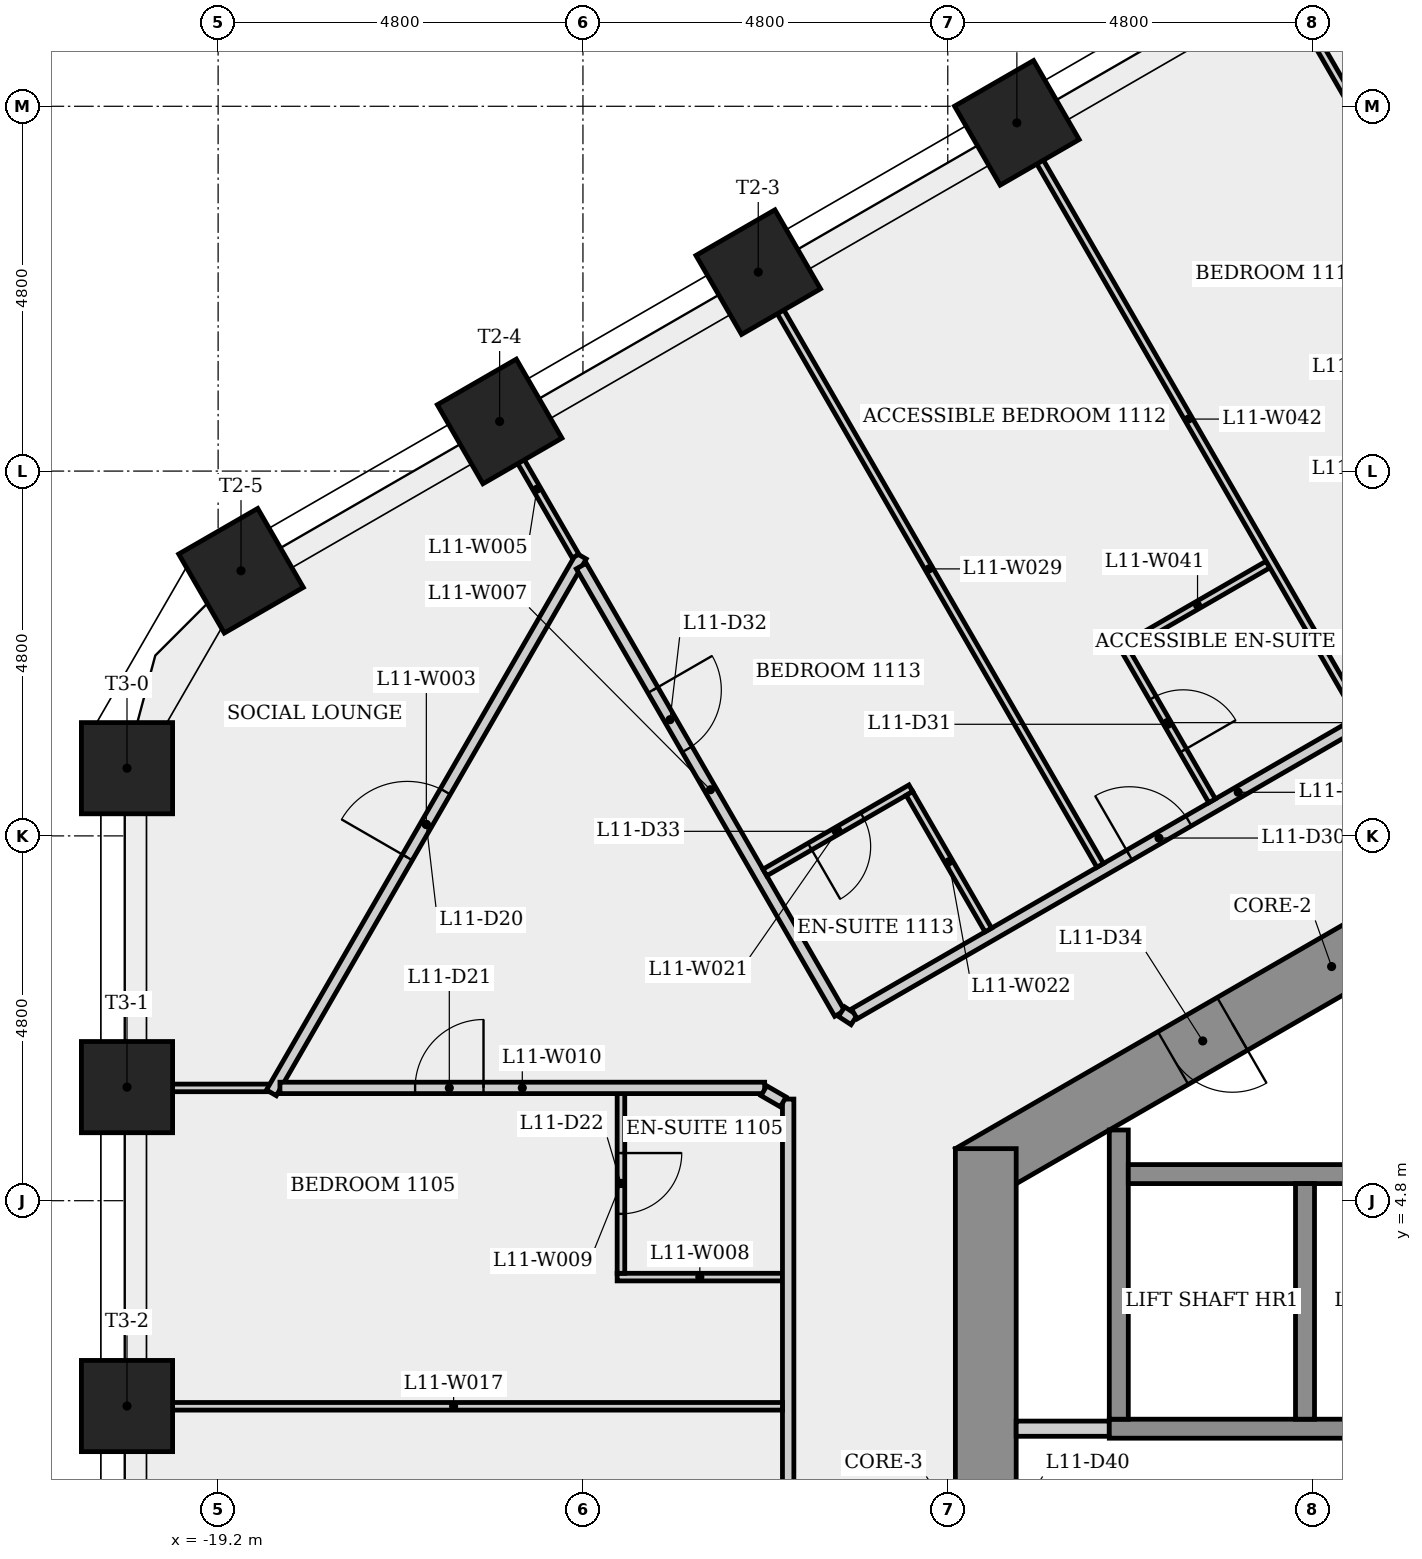
"""IFC4 building model, lengths in metres.
Left out: names, types, materials, properties, quantities, classifications, styles, units other than length and angle.
Written with IfcOpenShell. Run it as: python <this file> out.ifc"""

import sys

from ifc_helpers import new_model, si_unit, direction, frame, frame_2d, origin, origin_2d, place, context, subcontext, project, spatial, rectangle, extrude, element, fill, save


model = new_model("IFC4")
c1 = context("Model", 3, precision=1e-05, world=origin(), true_north=direction((0.0, 1.0)))
c2 = subcontext(c1, "Body", "Model", "MODEL_VIEW")
j1 = project(units=[si_unit("LENGTHUNIT", "METRE"), si_unit("PLANEANGLEUNIT", "RADIAN")], contexts=[c1])
p1 = place(None, origin())
s1 = spatial("IfcSite", under=j1, at=p1, CompositionType="ELEMENT")
p2 = place(p1, origin())
s2 = spatial("IfcBuilding", under=s1, at=p2, CompositionType="ELEMENT")
p3 = place(p2, frame((0.0, 0.0, 45.9)))
s3 = spatial("IfcBuildingStorey", under=s2, at=p3, CompositionType="ELEMENT", Elevation=45.9)
p4 = place(p3, frame((0.2, 10.623, 0.0), z_axis=(0.0, 0.0, 1.0), x_axis=(-0.866023993627, -0.500002442456, 0.0)))
e1 = element("IfcWall", 1, at=p4, inside=s3, PredefinedType="SHEAR", context=c2, shape_type="SweptSolid", body=[
    extrude(rectangle(XDim=10.97, YDim=0.8, at=frame_2d((5.485, 0.0))), origin(), (0.0, 0.0, 1.0), 3.4),
])
p5 = place(p4, frame((6.993, 0.0, 0.0)))
e2 = element("IfcOpeningElement", 2, at=p5, cuts=e1, PredefinedType="OPENING", context=c2, shape_type="SweptSolid", body=[
    extrude(rectangle(XDim=0.9, YDim=2.1, at=frame_2d((0.45, 1.05))), frame((0.0, 0.41, 0.0), z_axis=(0.0, -1.0, 0.0), x_axis=(1.0, 0.0, 0.0)), (0.0, 0.0, 1.0), 0.82),
])
p6 = place(p3, frame((-9.1, 5.485, 0.0), z_axis=(0.0, 0.0, 1.0), x_axis=(0.0, -1.0, 0.0)))
e3 = element("IfcWall", 3, at=p6, inside=s3, PredefinedType="SHEAR", context=c2, shape_type="SweptSolid", body=[
    extrude(rectangle(XDim=10.97, YDim=0.8, at=frame_2d((5.485, 0.0))), origin(), (0.0, 0.0, 1.0), 3.4),
])
p7 = place(p6, frame((4.685, 0.0, 0.0)))
e4 = element("IfcOpeningElement", 4, at=p7, cuts=e3, PredefinedType="OPENING", context=c2, shape_type="SweptSolid", body=[
    extrude(rectangle(XDim=1.6, YDim=2.1, at=frame_2d((0.8, 1.05))), frame((0.0, 0.41, 0.0), z_axis=(0.0, -1.0, 0.0), x_axis=(1.0, 0.0, 0.0)), (0.0, 0.0, 1.0), 0.82),
])
for number, where, z_axis, x_axis in (
    (5, (-8.691, 18.982, 0.0), (0.0, 0.0, 1.0), (-0.5, 0.866, 0.0)),
    (6, (-12.094, 17.018, 0.0), (0.0, 0.0, 1.0), (-0.5, 0.866, 0.0)),
    (7, (-15.496, 15.053, 0.0), (0.0, 0.0, 1.0), (-0.5, 0.866, 0.0)),
    (8, (-18.899, 13.089, 0.0), (0.0, 0.0, 1.0), (-0.5, 0.866, 0.0)),
    (9, (-20.399, 10.491, 0.0), (0.0, 0.0, 1.0), (-1.0, 0.0, 0.0)),
    (10, (-20.399, 6.294, 0.0), (0.0, 0.0, 1.0), (-1.0, 0.0, 0.0)),
    (11, (-20.399, 2.098, 0.0), (0.0, 0.0, 1.0), (-1.0, 0.0, 0.0)),
):
    element("IfcColumn", number, at=place(p3, frame(where, z_axis=z_axis, x_axis=x_axis)), inside=s3, PredefinedType="COLUMN", context=c2, shape_type="SweptSolid", body=[
        extrude(rectangle(XDim=1.2, YDim=1.2, at=origin_2d()), origin(), (0.0, 0.0, 1.0), 3.4),
    ])
p8 = place(p3, frame((-18.537, 6.284, 0.0), z_axis=(0.0, 0.0, 1.0), x_axis=(-1.0, 0.0, 0.0)))
e12 = element("IfcWall", 12, at=p8, inside=s3, PredefinedType="PARTITIONING", context=c2, shape_type="SweptSolid", body=[
    extrude(rectangle(XDim=1.892, YDim=0.1, at=frame_2d((0.946, 0.0))), origin(), (0.0, 0.0, 1.0), 3.05),
])
p9 = place(p3, frame((-18.499, 6.219, 0.0), z_axis=(0.0, 0.0, 1.0), x_axis=(0.499990257196, 0.866031028722, 0.0)))
e13 = element("IfcWall", 13, at=p9, inside=s3, PredefinedType="PARTITIONING", context=c2, shape_type="SweptSolid", body=[
    extrude(rectangle(XDim=8.155, YDim=0.15, at=frame_2d((4.077, 0.0))), origin(), (0.0, 0.0, 1.0), 3.05),
])
p10 = place(p9, frame((3.577, 0.0, 0.0)))
e14 = element("IfcOpeningElement", 14, at=p10, cuts=e13, PredefinedType="OPENING", context=c2, shape_type="SweptSolid", body=[
    extrude(rectangle(XDim=1.0, YDim=2.1, at=frame_2d((0.5, 1.05))), frame((0.0, 0.085, 0.0), z_axis=(0.0, -1.0, 0.0), x_axis=(1.0, 0.0, 0.0)), (0.0, 0.0, 1.0), 0.17),
])
p11 = place(p3, frame((-15.514, 15.043, 0.0), z_axis=(0.0, 0.0, 1.0), x_axis=(0.499985639223, -0.866033694824, 0.0)))
e15 = element("IfcWall", 15, at=p11, inside=s3, PredefinedType="PARTITIONING", context=c2, shape_type="SweptSolid", body=[
    extrude(rectangle(XDim=2.034, YDim=0.1, at=frame_2d((1.017, 0.0))), origin(), (0.0, 0.0, 1.0), 3.05),
])
p12 = place(p3, frame((-14.422, 13.151, 0.0), z_axis=(0.0, 0.0, 1.0), x_axis=(0.499974240439, -0.866040275563, 0.0)))
e16 = element("IfcWall", 16, at=p12, inside=s3, PredefinedType="PARTITIONING", context=c2, shape_type="SweptSolid", body=[
    extrude(rectangle(XDim=6.799, YDim=0.15, at=frame_2d((3.399, 0.0))), origin(), (0.0, 0.0, 1.0), 3.05),
])
p13 = place(p12, frame((1.885, 0.0, 0.0)))
e17 = element("IfcOpeningElement", 17, at=p13, cuts=e16, PredefinedType="OPENING", context=c2, shape_type="SweptSolid", body=[
    extrude(rectangle(XDim=0.9, YDim=2.1, at=frame_2d((0.45, 1.05))), frame((0.0, 0.085, 0.0), z_axis=(0.0, -1.0, 0.0), x_axis=(1.0, 0.0, 0.0)), (0.0, 0.0, 1.0), 0.17),
])
p14 = place(p3, frame((-13.95, 3.795, 0.0), z_axis=(0.0, 0.0, 1.0), x_axis=(1.0, 0.0, 0.0)))
e18 = element("IfcWall", 18, at=p14, inside=s3, PredefinedType="PARTITIONING", context=c2, shape_type="SweptSolid", body=[
    extrude(rectangle(XDim=2.175, YDim=0.1, at=frame_2d((1.087, 0.0))), origin(), (0.0, 0.0, 1.0), 3.05),
])
p15 = place(p3, frame((-13.9, 6.209, 0.0), z_axis=(0.0, 0.0, 1.0), x_axis=(0.0, -1.0, 0.0)))
e19 = element("IfcWall", 19, at=p15, inside=s3, PredefinedType="PARTITIONING", context=c2, shape_type="SweptSolid", body=[
    extrude(rectangle(XDim=2.364, YDim=0.1, at=frame_2d((1.182, 0.0))), origin(), (0.0, 0.0, 1.0), 3.05),
])
p16 = place(p15, frame((0.782, 0.0, 0.0)))
e20 = element("IfcOpeningElement", 20, at=p16, cuts=e19, PredefinedType="OPENING", context=c2, shape_type="SweptSolid", body=[
    extrude(rectangle(XDim=0.8, YDim=2.1, at=frame_2d((0.4, 1.05))), frame((0.0, 0.06, 0.0), z_axis=(0.0, -1.0, 0.0), x_axis=(1.0, 0.0, 0.0)), (0.0, 0.0, 1.0), 0.12),
])
p17 = place(p3, frame((-18.387, 6.284, 0.0), z_axis=(0.0, 0.0, 1.0), x_axis=(1.0, 0.0, 0.0)))
e21 = element("IfcWall", 21, at=p17, inside=s3, PredefinedType="PARTITIONING", context=c2, shape_type="SweptSolid", body=[
    extrude(rectangle(XDim=6.377, YDim=0.15, at=frame_2d((3.188, 0.0))), origin(), (0.0, 0.0, 1.0), 3.05),
])
p18 = place(p17, frame((1.778, 0.0, 0.0)))
e22 = element("IfcOpeningElement", 22, at=p18, cuts=e21, PredefinedType="OPENING", context=c2, shape_type="SweptSolid", body=[
    extrude(rectangle(XDim=0.9, YDim=2.1, at=frame_2d((0.45, 1.05))), frame((0.0, 0.085, 0.0), z_axis=(0.0, -1.0, 0.0), x_axis=(1.0, 0.0, 0.0)), (0.0, 0.0, 1.0), 0.17),
])
p19 = place(p3, frame((-11.7, 6.137, 0.0), z_axis=(0.0, 0.0, 1.0), x_axis=(0.0, -1.0, 0.0)))
e23 = element("IfcWall", 23, at=p19, inside=s3, PredefinedType="PARTITIONING", context=c2, shape_type="SweptSolid", body=[
    extrude(rectangle(XDim=12.125, YDim=0.15, at=frame_2d((6.062, 0.0))), origin(), (0.0, 0.0, 1.0), 3.05),
])
p20 = place(p19, frame((5.637, 0.0, 0.0)))
e24 = element("IfcOpeningElement", 24, at=p20, cuts=e23, PredefinedType="OPENING", context=c2, shape_type="SweptSolid", body=[
    extrude(rectangle(XDim=1.0, YDim=2.1, at=frame_2d((0.5, 1.05))), frame((0.0, 0.085, 0.0), z_axis=(0.0, -1.0, 0.0), x_axis=(1.0, 0.0, 0.0)), (0.0, 0.0, 1.0), 0.17),
])
p21 = place(p3, frame((-11.775, 2.095, 0.0), z_axis=(0.0, 0.0, 1.0), x_axis=(-1.0, 0.0, 0.0)))
e25 = element("IfcWall", 25, at=p21, inside=s3, PredefinedType="PARTITIONING", context=c2, shape_type="SweptSolid", body=[
    extrude(rectangle(XDim=8.654, YDim=0.1, at=frame_2d((4.327, 0.0))), origin(), (0.0, 0.0, 1.0), 3.05),
])
p22 = place(p3, frame((-11.765, 6.1, 0.0), z_axis=(0.0, 0.0, 1.0), x_axis=(-0.866088799389, 0.499890179513, 0.0)))
e26 = element("IfcWall", 26, at=p22, inside=s3, PredefinedType="PARTITIONING", context=c2, shape_type="SweptSolid", body=[
    extrude(rectangle(XDim=0.294, YDim=0.15, at=frame_2d((0.147, 0.0))), origin(), (0.0, 0.0, 1.0), 3.05),
])
p23 = place(p3, frame((-10.997, 7.287, 0.0), z_axis=(0.0, 0.0, 1.0), x_axis=(0.836578135118, -0.547847628307, 0.0)))
e27 = element("IfcWall", 27, at=p23, inside=s3, PredefinedType="PARTITIONING", context=c2, shape_type="SweptSolid", body=[
    extrude(rectangle(XDim=0.198, YDim=0.15, at=frame_2d((0.099, 0.0))), origin(), (0.0, 0.0, 1.0), 3.05),
])
p24 = place(p3, frame((-10.83, 7.258, 0.0), z_axis=(0.0, 0.0, 1.0), x_axis=(0.86602420186, 0.500002081789, 0.0)))
e28 = element("IfcWall", 28, at=p24, inside=s3, PredefinedType="PARTITIONING", context=c2, shape_type="SweptSolid", body=[
    extrude(rectangle(XDim=11.664, YDim=0.15, at=frame_2d((5.832, 0.0))), origin(), (0.0, 0.0, 1.0), 3.05),
])
p25 = place(p24, frame((4.178, 0.0, 0.0)))
e29 = element("IfcOpeningElement", 29, at=p25, cuts=e28, PredefinedType="OPENING", context=c2, shape_type="SweptSolid", body=[
    extrude(rectangle(XDim=0.9, YDim=2.1, at=frame_2d((0.45, 1.05))), frame((0.0, 0.085, 0.0), z_axis=(0.0, -1.0, 0.0), x_axis=(1.0, 0.0, 0.0)), (0.0, 0.0, 1.0), 0.17),
])
p26 = place(p3, frame((-10.086, 10.227, 0.0), z_axis=(0.0, 0.0, 1.0), x_axis=(-0.86602609819, -0.499998797252, 0.0)))
e30 = element("IfcWall", 30, at=p26, inside=s3, PredefinedType="PARTITIONING", context=c2, shape_type="SweptSolid", body=[
    extrude(rectangle(XDim=2.218, YDim=0.1, at=frame_2d((1.109, 0.0))), origin(), (0.0, 0.0, 1.0), 3.05),
])
p27 = place(p26, frame((0.734, 0.0, 0.0)))
e31 = element("IfcOpeningElement", 31, at=p27, cuts=e30, PredefinedType="OPENING", context=c2, shape_type="SweptSolid", body=[
    extrude(rectangle(XDim=0.8, YDim=2.1, at=frame_2d((0.4, 1.05))), frame((0.0, 0.06, 0.0), z_axis=(0.0, -1.0, 0.0), x_axis=(1.0, 0.0, 0.0)), (0.0, 0.0, 1.0), 0.12),
])
p28 = place(p3, frame((-9.067, 8.362, 0.0), z_axis=(0.0, 0.0, 1.0), x_axis=(-0.500061949227, 0.865989634427, 0.0)))
e32 = element("IfcWall", 32, at=p28, inside=s3, PredefinedType="PARTITIONING", context=c2, shape_type="SweptSolid", body=[
    extrude(rectangle(XDim=2.075, YDim=0.1, at=frame_2d((1.038, 0.0))), origin(), (0.0, 0.0, 1.0), 3.05),
])
p29 = place(p3, frame((-8.7, 1.8, 0.0), z_axis=(0.0, 0.0, 1.0), x_axis=(1.0, 0.0, 0.0)))
e33 = element("IfcWall", 33, at=p29, inside=s3, PredefinedType="PARTITIONING", context=c2, shape_type="SweptSolid", body=[
    extrude(rectangle(XDim=1.225, YDim=0.2, at=frame_2d((0.613, 0.0))), origin(), (0.0, 0.0, 1.0), 3.05),
])
p30 = place(p3, frame((-7.595, 9.212, 0.0), z_axis=(0.0, 0.0, 1.0), x_axis=(-0.500009404554, 0.866019973994, 0.0)))
e34 = element("IfcWall", 34, at=p30, inside=s3, PredefinedType="PARTITIONING", context=c2, shape_type="SweptSolid", body=[
    extrude(rectangle(XDim=9.01, YDim=0.1, at=frame_2d((4.505, 0.0))), origin(), (0.0, 0.0, 1.0), 3.05),
])
p31 = place(p3, frame((-7.475, 1.8, 0.0), z_axis=(0.0, 0.0, 1.0), x_axis=(1.0, 0.0, 0.0)))
e35 = element("IfcWall", 35, at=p31, inside=s3, PredefinedType="SHEAR", context=c2, shape_type="SweptSolid", body=[
    extrude(rectangle(XDim=14.95, YDim=0.25, at=frame_2d((7.475, 0.0))), origin(), (0.0, 0.0, 1.0), 3.05),
])
p32 = place(p3, frame((-7.35, 1.925, 0.0), z_axis=(0.0, 0.0, 1.0), x_axis=(0.0, 1.0, 0.0)))
e36 = element("IfcWall", 36, at=p32, inside=s3, PredefinedType="SHEAR", context=c2, shape_type="SweptSolid", body=[
    extrude(rectangle(XDim=3.805, YDim=0.25, at=frame_2d((1.903, 0.0))), origin(), (0.0, 0.0, 1.0), 3.05),
])
p33 = place(p3, frame((-7.225, 5.15, 0.0), z_axis=(0.0, 0.0, 1.0), x_axis=(1.0, 0.0, 0.0)))
e37 = element("IfcWall", 37, at=p33, inside=s3, PredefinedType="SHEAR", context=c2, shape_type="SweptSolid", body=[
    extrude(rectangle(XDim=14.7, YDim=0.25, at=frame_2d((7.35, 0.0))), origin(), (0.0, 0.0, 1.0), 3.05),
])
p34 = place(p3, frame((-7.31, 12.119, 0.0), z_axis=(0.0, 0.0, 1.0), x_axis=(0.499986429846, -0.866033238375, 0.0)))
e38 = element("IfcWall", 38, at=p34, inside=s3, PredefinedType="PARTITIONING", context=c2, shape_type="SweptSolid", body=[
    extrude(rectangle(XDim=2.375, YDim=0.1, at=frame_2d((1.188, 0.0))), origin(), (0.0, 0.0, 1.0), 3.05),
])
p35 = place(p34, frame((0.812, 0.0, 0.0)))
e39 = element("IfcOpeningElement", 39, at=p35, cuts=e38, PredefinedType="OPENING", context=c2, shape_type="SweptSolid", body=[
    extrude(rectangle(XDim=0.8, YDim=2.1, at=frame_2d((0.4, 1.05))), frame((0.0, 0.06, 0.0), z_axis=(0.0, -1.0, 0.0), x_axis=(1.0, 0.0, 0.0)), (0.0, 0.0, 1.0), 0.12),
])
p36 = place(p3, frame((-5.386, 13.172, 0.0), z_axis=(0.0, 0.0, 1.0), x_axis=(-0.86604708139, -0.499962451406, 0.0)))
e40 = element("IfcWall", 40, at=p36, inside=s3, PredefinedType="PARTITIONING", context=c2, shape_type="SweptSolid", body=[
    extrude(rectangle(XDim=2.143, YDim=0.1, at=frame_2d((1.071, 0.0))), origin(), (0.0, 0.0, 1.0), 3.05),
])
p37 = place(p3, frame((-8.685, 18.986, 0.0), z_axis=(0.0, 0.0, 1.0), x_axis=(0.499989081013, -0.866031707772, 0.0)))
e41 = element("IfcWall", 41, at=p37, inside=s3, PredefinedType="PARTITIONING", context=c2, shape_type="SweptSolid", body=[
    extrude(rectangle(XDim=9.01, YDim=0.1, at=frame_2d((4.505, 0.0))), origin(), (0.0, 0.0, 1.0), 3.05),
])
p38 = place(p3, frame((-4.9, 5.025, 0.0), z_axis=(0.0, 0.0, 1.0), x_axis=(0.0, -1.0, 0.0)))
e42 = element("IfcWall", 42, at=p38, inside=s3, PredefinedType="SHEAR", context=c2, shape_type="SweptSolid", body=[
    extrude(rectangle(XDim=3.1, YDim=0.25, at=frame_2d((1.55, 0.0))), origin(), (0.0, 0.0, 1.0), 3.4),
])
p39 = place(p3, frame((-2.868, 16.795, 0.0), z_axis=(0.0, 0.0, 1.0), x_axis=(-0.499980464184, 0.866036682499, 0.0)))
e43 = element("IfcWall", 43, at=p39, inside=s3, PredefinedType="PARTITIONING", context=c2, shape_type="SweptSolid", body=[
    extrude(rectangle(XDim=4.805, YDim=0.1, at=frame_2d((2.403, 0.0))), origin(), (0.0, 0.0, 1.0), 3.05),
])
p40 = place(p10, origin())
e44 = element("IfcDoor", 44, at=p40, inside=s3, OperationType="SINGLE_SWING_LEFT", PredefinedType="DOOR", context=c2, shape_type="SweptSolid", body=[
    extrude(rectangle(XDim=1.0, YDim=2.1, at=frame_2d((0.5, 1.05))), frame((0.0, 0.025, 0.0), z_axis=(0.0, -1.0, 0.0), x_axis=(1.0, 0.0, 0.0)), (0.0, 0.0, 1.0), 0.05),
])
fill(e14, e44)
p41 = place(p18, origin())
e45 = element("IfcDoor", 45, at=p41, inside=s3, OperationType="SINGLE_SWING_RIGHT", PredefinedType="DOOR", context=c2, shape_type="SweptSolid", body=[
    extrude(rectangle(XDim=0.9, YDim=2.1, at=frame_2d((0.45, 1.05))), frame((0.0, 0.025, 0.0), z_axis=(0.0, -1.0, 0.0), x_axis=(1.0, 0.0, 0.0)), (0.0, 0.0, 1.0), 0.05),
])
fill(e22, e45)
p42 = place(p16, origin())
e46 = element("IfcDoor", 46, at=p42, inside=s3, OperationType="SINGLE_SWING_LEFT", PredefinedType="DOOR", context=c2, shape_type="SweptSolid", body=[
    extrude(rectangle(XDim=0.8, YDim=2.1, at=frame_2d((0.4, 1.05))), frame((0.0, 0.025, 0.0), z_axis=(0.0, -1.0, 0.0), x_axis=(1.0, 0.0, 0.0)), (0.0, 0.0, 1.0), 0.05),
])
fill(e20, e46)
p43 = place(p25, origin())
e47 = element("IfcDoor", 47, at=p43, inside=s3, OperationType="SINGLE_SWING_LEFT", PredefinedType="DOOR", context=c2, shape_type="SweptSolid", body=[
    extrude(rectangle(XDim=0.9, YDim=2.1, at=frame_2d((0.45, 1.05))), frame((0.0, 0.025, 0.0), z_axis=(0.0, -1.0, 0.0), x_axis=(1.0, 0.0, 0.0)), (0.0, 0.0, 1.0), 0.05),
])
fill(e29, e47)
p44 = place(p35, origin())
e48 = element("IfcDoor", 48, at=p44, inside=s3, OperationType="SINGLE_SWING_RIGHT", PredefinedType="DOOR", context=c2, shape_type="SweptSolid", body=[
    extrude(rectangle(XDim=0.8, YDim=2.1, at=frame_2d((0.4, 1.05))), frame((0.0, 0.025, 0.0), z_axis=(0.0, -1.0, 0.0), x_axis=(1.0, 0.0, 0.0)), (0.0, 0.0, 1.0), 0.05),
])
fill(e39, e48)
p45 = place(p13, origin())
e49 = element("IfcDoor", 49, at=p45, inside=s3, OperationType="SINGLE_SWING_LEFT", PredefinedType="DOOR", context=c2, shape_type="SweptSolid", body=[
    extrude(rectangle(XDim=0.9, YDim=2.1, at=frame_2d((0.45, 1.05))), frame((0.0, 0.025, 0.0), z_axis=(0.0, -1.0, 0.0), x_axis=(1.0, 0.0, 0.0)), (0.0, 0.0, 1.0), 0.05),
])
fill(e17, e49)
p46 = place(p27, origin())
e50 = element("IfcDoor", 50, at=p46, inside=s3, OperationType="SINGLE_SWING_RIGHT", PredefinedType="DOOR", context=c2, shape_type="SweptSolid", body=[
    extrude(rectangle(XDim=0.8, YDim=2.1, at=frame_2d((0.4, 1.05))), frame((0.0, 0.025, 0.0), z_axis=(0.0, -1.0, 0.0), x_axis=(1.0, 0.0, 0.0)), (0.0, 0.0, 1.0), 0.05),
])
fill(e31, e50)
p47 = place(p5, origin())
e51 = element("IfcDoor", 51, at=p47, inside=s3, OperationType="SINGLE_SWING_LEFT", PredefinedType="DOOR", context=c2, shape_type="SweptSolid", body=[
    extrude(rectangle(XDim=0.9, YDim=2.1, at=frame_2d((0.45, 1.05))), frame((0.0, 0.025, 0.0), z_axis=(0.0, -1.0, 0.0), x_axis=(1.0, 0.0, 0.0)), (0.0, 0.0, 1.0), 0.05),
])
fill(e2, e51)
save(model, sys.argv[1])
